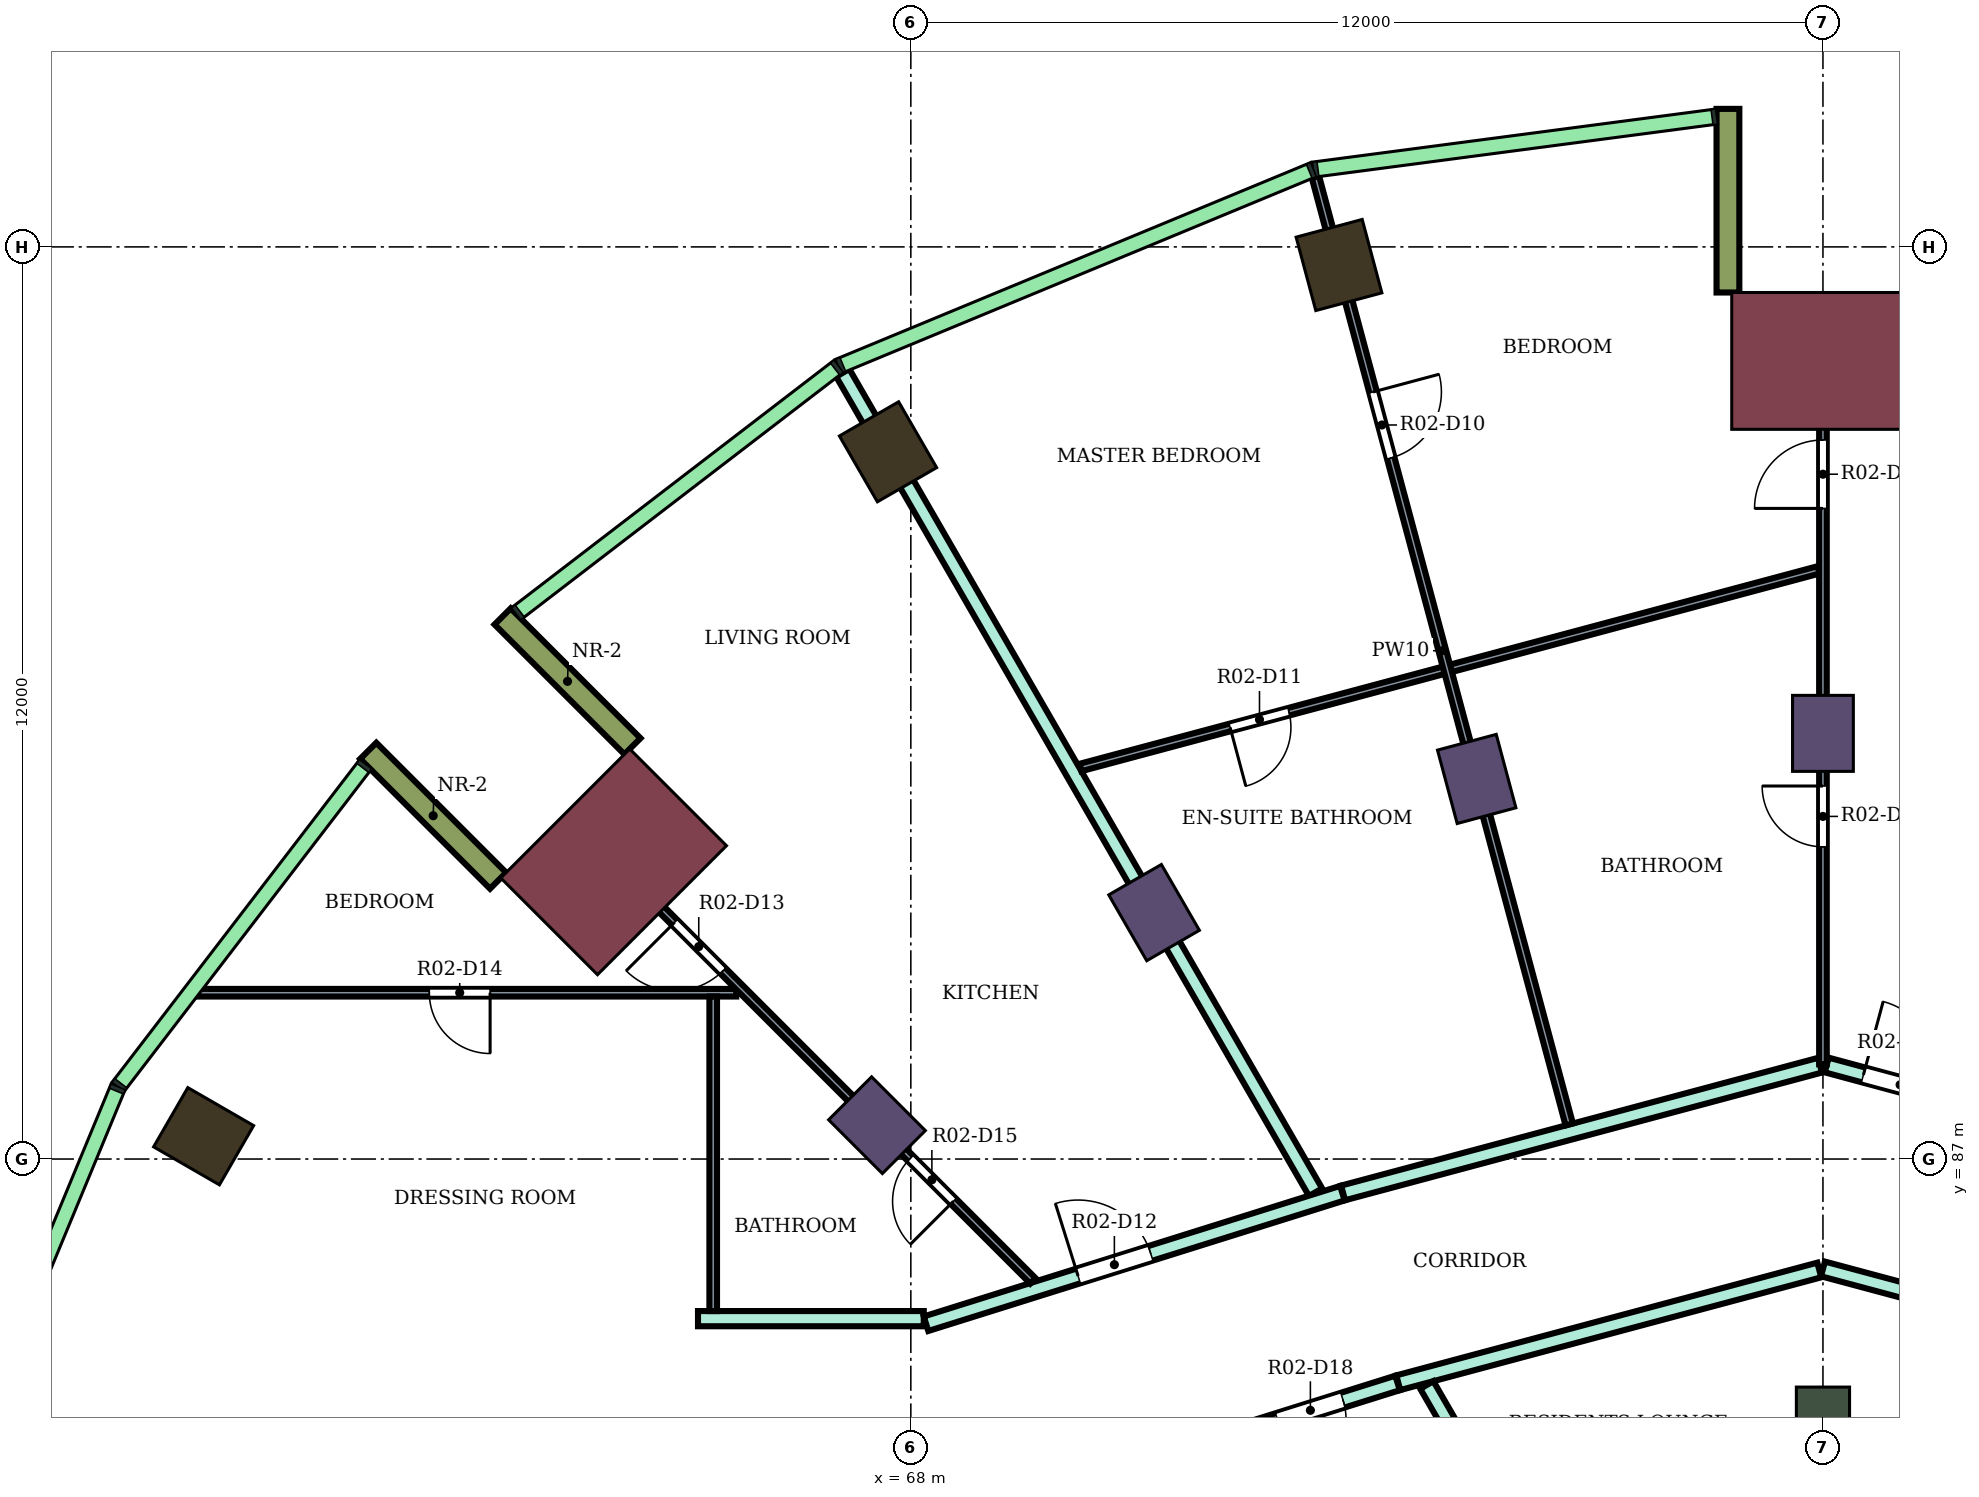
"""IFC4 building model, lengths in metres.
Left out: names, types, materials, properties, quantities, classifications, styles, units other than length and angle.
Written with IfcOpenShell. Run it as: python <this file> out.ifc"""

import sys

from ifc_helpers import new_model, si_unit, direction, frame, frame_2d, origin, origin_2d, place, context, subcontext, project, spatial, rectangle, extrude, element, fill, save


model = new_model("IFC4")
c1 = context("Model", 3, precision=1e-05, world=origin(), true_north=direction((0.0, 1.0)))
c2 = subcontext(c1, "Body", "Model", "MODEL_VIEW")
j1 = project(units=[si_unit("LENGTHUNIT", "METRE"), si_unit("PLANEANGLEUNIT", "RADIAN")], contexts=[c1])
p1 = place(None, origin())
s1 = spatial("IfcSite", under=j1, at=p1, CompositionType="ELEMENT")
p2 = place(p1, origin())
s2 = spatial("IfcBuilding", under=s1, at=p2, CompositionType="ELEMENT")
p3 = place(p2, frame((0.0, 0.0, 170.0)))
s3 = spatial("IfcBuildingStorey", under=s2, at=p3, CompositionType="ELEMENT", Elevation=170.0)
for number, where, z_axis, x_axis in (
    (1, (73.633, 98.762, 0.0), (0.0, 0.0, 1.0), (-0.259, 0.966, 0.0)),
    (2, (67.7, 96.304, 0.0), (0.0, 0.0, 1.0), (-0.5, 0.866, 0.0)),
    (3, (58.696, 87.3, 0.0), (0.0, 0.0, 1.0), (-0.866, 0.5, 0.0)),
):
    element("IfcColumn", number, at=place(p3, frame(where, z_axis=z_axis, x_axis=x_axis)), inside=s3, PredefinedType="COLUMN", context=c2, shape_type="SweptSolid", body=[
        extrude(rectangle(XDim=1.0, YDim=0.9, at=origin_2d()), origin(), (0.0, 0.0, 1.0), 4.1),
    ])
for number, where, z_axis, x_axis in (
    (4, (80.0, 92.6, 0.0), (0.0, 0.0, 1.0), (0.0, 1.0, 0.0)),
    (5, (75.445, 92.0, 0.0), (0.0, 0.0, 1.0), (-0.259, 0.966, 0.0)),
    (6, (71.2, 90.242, 0.0), (0.0, 0.0, 1.0), (-0.5, 0.866, 0.0)),
    (7, (67.555, 87.445, 0.0), (0.0, 0.0, 1.0), (-0.707, 0.707, 0.0)),
):
    element("IfcColumn", number, at=place(p3, frame(where, z_axis=z_axis, x_axis=x_axis)), inside=s3, PredefinedType="COLUMN", context=c2, shape_type="SweptSolid", body=[
        extrude(rectangle(XDim=1.0, YDim=0.8, at=origin_2d()), origin(), (0.0, 0.0, 1.0), 4.1),
    ])
p4 = place(p3, frame((80.0, 83.6, 0.0), z_axis=(0.0, 0.0, 1.0), x_axis=(0.0, 1.0, 0.0)))
e8 = element("IfcColumn", 8, at=p4, inside=s3, PredefinedType="COLUMN", context=c2, shape_type="SweptSolid", body=[
    extrude(rectangle(XDim=0.8, YDim=0.7, at=origin_2d()), origin(), (0.0, 0.0, 1.0), 4.1),
])
for number, where, z_axis, x_axis in (
    (9, (80.0, 97.5, 0.0), (0.0, 0.0, 1.0), (0.0, 1.0, 0.0)),
    (10, (64.09, 90.91, 0.0), (0.0, 0.0, 1.0), (-0.707, 0.707, 0.0)),
):
    element("IfcColumn", number, at=place(p3, frame(where, z_axis=z_axis, x_axis=x_axis)), inside=s3, PredefinedType="COLUMN", context=c2, shape_type="SweptSolid", body=[
        extrude(rectangle(XDim=1.8, YDim=2.4, at=origin_2d()), origin(), (0.0, 0.0, 1.0), 4.1),
    ])
for number, where, z_axis, x_axis in (
    (11, (78.75, 98.4, 0.0), (0.0, 0.0, 1.0), (0.0, 1.0, 0.0)),
    (12, (64.338, 92.43, 0.0), (0.0, 0.0, 1.0), (-0.707, 0.707, 0.0)),
    (13, (62.57, 90.662, 0.0), (0.0, 0.0, 1.0), (-0.707, 0.707, 0.0)),
):
    element("IfcWall", number, at=place(p3, frame(where, z_axis=z_axis, x_axis=x_axis)), inside=s3, PredefinedType="NOTDEFINED", context=c2, shape_type="SweptSolid", body=[
        extrude(rectangle(XDim=2.416, YDim=0.3, at=frame_2d((1.208, 0.0))), origin(), (0.0, 0.0, 1.0), 4.1),
    ])
p5 = place(p3, frame((65.2, 84.9, 0.0), z_axis=(0.0, 0.0, 1.0), x_axis=(1.0, 0.0, 0.0)))
e14 = element("IfcWall", 14, at=p5, inside=s3, PredefinedType="PARTITIONING", context=c2, shape_type="SweptSolid", body=[
    extrude(rectangle(XDim=2.97, YDim=0.2, at=frame_2d((1.485, 0.0))), origin(), (0.0, 0.0, 1.0), 3.65),
])
p6 = place(p3, frame((67.104, 97.343, 0.0), z_axis=(0.0, 0.0, 1.0), x_axis=(0.499841888023, -0.866116670534, 0.0)))
e15 = element("IfcWall", 15, at=p6, inside=s3, PredefinedType="PARTITIONING", context=c2, shape_type="SweptSolid", body=[
    extrude(rectangle(XDim=12.446, YDim=0.2, at=frame_2d((6.223, 0.0))), origin(), (0.0, 0.0, 1.0), 3.65),
])
p7 = place(p3, frame((68.2, 84.833, 0.0), z_axis=(0.0, 0.0, 1.0), x_axis=(0.954191968402, 0.299195065863, 0.0)))
e16 = element("IfcWall", 16, at=p7, inside=s3, PredefinedType="PARTITIONING", context=c2, shape_type="SweptSolid", body=[
    extrude(rectangle(XDim=5.74, YDim=0.2, at=frame_2d((2.87, 0.0))), origin(), (0.0, 0.0, 1.0), 3.65),
])
p8 = place(p7, frame((2.097, 0.0, 0.0)))
e17 = element("IfcOpeningElement", 17, at=p8, cuts=e16, PredefinedType="OPENING", context=c2, shape_type="SweptSolid", body=[
    extrude(rectangle(XDim=1.0, YDim=2.1, at=frame_2d((0.5, 1.05))), frame((0.0, 0.11, 0.0), z_axis=(0.0, -1.0, 0.0), x_axis=(1.0, 0.0, 0.0)), (0.0, 0.0, 1.0), 0.22),
])
p9 = place(p3, frame((72.1, 83.332, 0.0), z_axis=(0.0, 0.0, 1.0), x_axis=(0.954233106619, 0.299063836383, 0.0)))
e18 = element("IfcWall", 18, at=p9, inside=s3, PredefinedType="PARTITIONING", context=c2, shape_type="SweptSolid", body=[
    extrude(rectangle(XDim=2.414, YDim=0.2, at=frame_2d((1.207, 0.0))), origin(), (0.0, 0.0, 1.0), 3.65),
])
p10 = place(p9, frame((0.762, 0.0, 0.0)))
e19 = element("IfcOpeningElement", 19, at=p10, cuts=e18, PredefinedType="OPENING", context=c2, shape_type="SweptSolid", body=[
    extrude(rectangle(XDim=0.9, YDim=2.1, at=frame_2d((0.45, 1.05))), frame((0.0, 0.11, 0.0), z_axis=(0.0, -1.0, 0.0), x_axis=(1.0, 0.0, 0.0)), (0.0, 0.0, 1.0), 0.22),
])
p11 = place(p3, frame((73.687, 86.554, 0.0), z_axis=(0.0, 0.0, 1.0), x_axis=(0.96595928904, 0.258694128106, 0.0)))
e20 = element("IfcWall", 20, at=p11, inside=s3, PredefinedType="PARTITIONING", context=c2, shape_type="SweptSolid", body=[
    extrude(rectangle(XDim=6.496, YDim=0.2, at=frame_2d((3.248, 0.0))), origin(), (0.0, 0.0, 1.0), 3.65),
])
p12 = place(p3, frame((74.413, 84.057, 0.0), z_axis=(0.0, 0.0, 1.0), x_axis=(0.965970849692, 0.258650956976, 0.0)))
e21 = element("IfcWall", 21, at=p12, inside=s3, PredefinedType="PARTITIONING", context=c2, shape_type="SweptSolid", body=[
    extrude(rectangle(XDim=5.734, YDim=0.2, at=frame_2d((2.867, 0.0))), origin(), (0.0, 0.0, 1.0), 3.65),
])
p13 = place(p3, frame((74.788, 84.028, 0.0), z_axis=(0.0, 0.0, 1.0), x_axis=(0.499859501914, -0.866106505198, 0.0)))
e22 = element("IfcWall", 22, at=p13, inside=s3, PredefinedType="PARTITIONING", context=c2, shape_type="SweptSolid", body=[
    extrude(rectangle(XDim=2.724, YDim=0.2, at=frame_2d((1.362, 0.0))), origin(), (0.0, 0.0, 1.0), 3.65),
])
p14 = place(p3, frame((80.0, 85.554, 0.0), z_axis=(0.0, 0.0, 1.0), x_axis=(0.965894438951, -0.258936155845, 0.0)))
e23 = element("IfcWall", 23, at=p14, inside=s3, PredefinedType="PARTITIONING", context=c2, shape_type="SweptSolid", body=[
    extrude(rectangle(XDim=5.774, YDim=0.2, at=frame_2d((2.887, 0.0))), origin(), (0.0, 0.0, 1.0), 3.65),
])
p15 = place(p14, frame((1.841, 0.0, 0.0)))
e24 = element("IfcOpeningElement", 24, at=p15, cuts=e23, PredefinedType="OPENING", context=c2, shape_type="SweptSolid", body=[
    extrude(rectangle(XDim=1.8, YDim=2.1, at=frame_2d((0.9, 1.05))), frame((0.0, 0.11, 0.0), z_axis=(0.0, -1.0, 0.0), x_axis=(1.0, 0.0, 0.0)), (0.0, 0.0, 1.0), 0.22),
])
p16 = place(p3, frame((80.049, 88.237, 0.0), z_axis=(0.0, 0.0, 1.0), x_axis=(0.965582990495, -0.260095152718, 0.0)))
e25 = element("IfcWall", 25, at=p16, inside=s3, PredefinedType="PARTITIONING", context=c2, shape_type="SweptSolid", body=[
    extrude(rectangle(XDim=6.476, YDim=0.2, at=frame_2d((3.238, 0.0))), origin(), (0.0, 0.0, 1.0), 3.65),
])
p17 = place(p16, frame((0.5, 0.0, 0.0)))
e26 = element("IfcOpeningElement", 26, at=p17, cuts=e25, PredefinedType="OPENING", context=c2, shape_type="SweptSolid", body=[
    extrude(rectangle(XDim=1.0, YDim=2.1, at=frame_2d((0.5, 1.05))), frame((0.0, 0.11, 0.0), z_axis=(0.0, -1.0, 0.0), x_axis=(1.0, 0.0, 0.0)), (0.0, 0.0, 1.0), 0.22),
])
p18 = place(p3, frame((58.6, 89.188, 0.0), z_axis=(0.0, 0.0, 1.0), x_axis=(1.0, 0.0, 0.0)))
e27 = element("IfcWall", 27, at=p18, inside=s3, PredefinedType="PARTITIONING", context=c2, shape_type="SweptSolid", body=[
    extrude(rectangle(XDim=7.103, YDim=0.1, at=frame_2d((3.551, 0.0))), origin(), (0.0, 0.0, 1.0), 3.65),
])
p19 = place(p18, frame((3.065, 0.0, 0.0)))
e28 = element("IfcOpeningElement", 28, at=p19, cuts=e27, PredefinedType="OPENING", context=c2, shape_type="SweptSolid", body=[
    extrude(rectangle(XDim=0.8, YDim=2.1, at=frame_2d((0.4, 1.05))), frame((0.0, 0.06, 0.0), z_axis=(0.0, -1.0, 0.0), x_axis=(1.0, 0.0, 0.0)), (0.0, 0.0, 1.0), 0.12),
])
p20 = place(p3, frame((63.598, 91.407, 0.0), z_axis=(0.0, 0.0, 1.0), x_axis=(0.70700623685, -0.707207311228, 0.0)))
e29 = element("IfcWall", 29, at=p20, inside=s3, PredefinedType="PARTITIONING", context=c2, shape_type="SweptSolid", body=[
    extrude(rectangle(XDim=8.499, YDim=0.1, at=frame_2d((4.25, 0.0))), origin(), (0.0, 0.0, 1.0), 3.65),
])
p21 = place(p20, frame((1.83, 0.0, 0.0)))
e30 = element("IfcOpeningElement", 30, at=p21, cuts=e29, PredefinedType="OPENING", context=c2, shape_type="SweptSolid", body=[
    extrude(rectangle(XDim=0.9, YDim=2.1, at=frame_2d((0.45, 1.05))), frame((0.0, 0.06, 0.0), z_axis=(0.0, -1.0, 0.0), x_axis=(1.0, 0.0, 0.0)), (0.0, 0.0, 1.0), 0.12),
])
p22 = place(p20, frame((6.219, 0.0, 0.0)))
e31 = element("IfcOpeningElement", 31, at=p22, cuts=e29, PredefinedType="OPENING", context=c2, shape_type="SweptSolid", body=[
    extrude(rectangle(XDim=0.8, YDim=2.1, at=frame_2d((0.4, 1.05))), frame((0.0, 0.06, 0.0), z_axis=(0.0, -1.0, 0.0), x_axis=(1.0, 0.0, 0.0)), (0.0, 0.0, 1.0), 0.12),
])
p23 = place(p3, frame((65.4, 85.0, 0.0), z_axis=(0.0, 0.0, 1.0), x_axis=(0.0, 1.0, 0.0)))
e32 = element("IfcWall", 32, at=p23, inside=s3, PredefinedType="PARTITIONING", context=c2, shape_type="SweptSolid", body=[
    extrude(rectangle(XDim=4.138, YDim=0.1, at=frame_2d((2.069, 0.0))), origin(), (0.0, 0.0, 1.0), 3.65),
])
p24 = place(p3, frame((70.232, 92.151, 0.0), z_axis=(0.0, 0.0, 1.0), x_axis=(0.965980126086, 0.258616310405, 0.0)))
e33 = element("IfcWall", 33, at=p24, inside=s3, PredefinedType="PARTITIONING", context=c2, shape_type="SweptSolid", body=[
    extrude(rectangle(XDim=10.053, YDim=0.1, at=frame_2d((5.026, 0.0))), origin(), (0.0, 0.0, 1.0), 3.65),
])
p25 = place(p24, frame((2.038, 0.0, 0.0)))
e34 = element("IfcOpeningElement", 34, at=p25, cuts=e33, PredefinedType="OPENING", context=c2, shape_type="SweptSolid", body=[
    extrude(rectangle(XDim=0.8, YDim=2.1, at=frame_2d((0.4, 1.05))), frame((0.0, 0.06, 0.0), z_axis=(0.0, -1.0, 0.0), x_axis=(1.0, 0.0, 0.0)), (0.0, 0.0, 1.0), 0.12),
])
p26 = place(p3, frame((73.323, 99.919, 0.0), z_axis=(0.0, 0.0, 1.0), x_axis=(0.258768239436, -0.965939438194, 0.0)))
e35 = element("IfcWall", 35, at=p26, inside=s3, PredefinedType="PARTITIONING", context=c2, shape_type="SweptSolid", body=[
    extrude(rectangle(XDim=12.904, YDim=0.1, at=frame_2d((6.452, 0.0))), origin(), (0.0, 0.0, 1.0), 3.65),
])
p27 = place(p26, frame((2.927, 0.0, 0.0)))
e36 = element("IfcOpeningElement", 36, at=p27, cuts=e35, PredefinedType="OPENING", context=c2, shape_type="SweptSolid", body=[
    extrude(rectangle(XDim=0.9, YDim=2.1, at=frame_2d((0.45, 1.05))), frame((0.0, 0.06, 0.0), z_axis=(0.0, -1.0, 0.0), x_axis=(1.0, 0.0, 0.0)), (0.0, 0.0, 1.0), 0.12),
])
p28 = place(p3, frame((80.0, 88.246, 0.0), z_axis=(0.0, 0.0, 1.0), x_axis=(0.0, 1.0, 0.0)))
e37 = element("IfcWall", 37, at=p28, inside=s3, PredefinedType="PARTITIONING", context=c2, shape_type="SweptSolid", body=[
    extrude(rectangle(XDim=9.954, YDim=0.1, at=frame_2d((4.977, 0.0))), origin(), (0.0, 0.0, 1.0), 3.65),
])
p29 = place(p28, frame((7.313, 0.0, 0.0)))
e38 = element("IfcOpeningElement", 38, at=p29, cuts=e37, PredefinedType="OPENING", context=c2, shape_type="SweptSolid", body=[
    extrude(rectangle(XDim=0.9, YDim=2.1, at=frame_2d((0.45, 1.05))), frame((0.0, 0.06, 0.0), z_axis=(0.0, -1.0, 0.0), x_axis=(1.0, 0.0, 0.0)), (0.0, 0.0, 1.0), 0.12),
])
p30 = place(p28, frame((2.862, 0.0, 0.0)))
e39 = element("IfcOpeningElement", 39, at=p30, cuts=e37, PredefinedType="OPENING", context=c2, shape_type="SweptSolid", body=[
    extrude(rectangle(XDim=0.8, YDim=2.1, at=frame_2d((0.4, 1.05))), frame((0.0, 0.06, 0.0), z_axis=(0.0, -1.0, 0.0), x_axis=(1.0, 0.0, 0.0)), (0.0, 0.0, 1.0), 0.12),
])
p31 = place(p17, origin())
e40 = element("IfcDoor", 40, at=p31, inside=s3, OperationType="SINGLE_SWING_LEFT", PredefinedType="DOOR", context=c2, shape_type="SweptSolid", body=[
    extrude(rectangle(XDim=1.0, YDim=2.1, at=frame_2d((0.5, 1.05))), frame((0.0, 0.025, 0.0), z_axis=(0.0, -1.0, 0.0), x_axis=(1.0, 0.0, 0.0)), (0.0, 0.0, 1.0), 0.05),
])
fill(e26, e40)
p32 = place(p29, origin())
e41 = element("IfcDoor", 41, at=p32, inside=s3, OperationType="SINGLE_SWING_LEFT", PredefinedType="DOOR", context=c2, shape_type="SweptSolid", body=[
    extrude(rectangle(XDim=0.9, YDim=2.1, at=frame_2d((0.45, 1.05))), frame((0.0, 0.025, 0.0), z_axis=(0.0, -1.0, 0.0), x_axis=(1.0, 0.0, 0.0)), (0.0, 0.0, 1.0), 0.05),
])
fill(e38, e41)
p33 = place(p30, origin())
e42 = element("IfcDoor", 42, at=p33, inside=s3, OperationType="SINGLE_SWING_RIGHT", PredefinedType="DOOR", context=c2, shape_type="SweptSolid", body=[
    extrude(rectangle(XDim=0.8, YDim=2.1, at=frame_2d((0.4, 1.05))), frame((0.0, 0.025, 0.0), z_axis=(0.0, -1.0, 0.0), x_axis=(1.0, 0.0, 0.0)), (0.0, 0.0, 1.0), 0.05),
])
fill(e39, e42)
p34 = place(p27, origin())
e43 = element("IfcDoor", 43, at=p34, inside=s3, OperationType="SINGLE_SWING_LEFT", PredefinedType="DOOR", context=c2, shape_type="SweptSolid", body=[
    extrude(rectangle(XDim=0.9, YDim=2.1, at=frame_2d((0.45, 1.05))), frame((0.0, 0.025, 0.0), z_axis=(0.0, -1.0, 0.0), x_axis=(1.0, 0.0, 0.0)), (0.0, 0.0, 1.0), 0.05),
])
fill(e36, e43)
p35 = place(p25, frame((0.8, 0.0, 0.0), z_axis=(0.0, 0.0, 1.0), x_axis=(-1.0, 0.0, 0.0)))
e44 = element("IfcDoor", 44, at=p35, inside=s3, OperationType="SINGLE_SWING_RIGHT", PredefinedType="DOOR", context=c2, shape_type="SweptSolid", body=[
    extrude(rectangle(XDim=0.8, YDim=2.1, at=frame_2d((0.4, 1.05))), frame((0.0, 0.025, 0.0), z_axis=(0.0, -1.0, 0.0), x_axis=(1.0, 0.0, 0.0)), (0.0, 0.0, 1.0), 0.05),
])
fill(e34, e44)
p36 = place(p8, origin())
e45 = element("IfcDoor", 45, at=p36, inside=s3, OperationType="SINGLE_SWING_LEFT", PredefinedType="DOOR", context=c2, shape_type="SweptSolid", body=[
    extrude(rectangle(XDim=1.0, YDim=2.1, at=frame_2d((0.5, 1.05))), frame((0.0, 0.025, 0.0), z_axis=(0.0, -1.0, 0.0), x_axis=(1.0, 0.0, 0.0)), (0.0, 0.0, 1.0), 0.05),
])
fill(e17, e45)
p37 = place(p21, frame((0.9, 0.0, 0.0), z_axis=(0.0, 0.0, 1.0), x_axis=(-1.0, 0.0, 0.0)))
e46 = element("IfcDoor", 46, at=p37, inside=s3, OperationType="SINGLE_SWING_RIGHT", PredefinedType="DOOR", context=c2, shape_type="SweptSolid", body=[
    extrude(rectangle(XDim=0.9, YDim=2.1, at=frame_2d((0.45, 1.05))), frame((0.0, 0.025, 0.0), z_axis=(0.0, -1.0, 0.0), x_axis=(1.0, 0.0, 0.0)), (0.0, 0.0, 1.0), 0.05),
])
fill(e30, e46)
p38 = place(p19, frame((0.8, 0.0, 0.0), z_axis=(0.0, 0.0, 1.0), x_axis=(-1.0, 0.0, 0.0)))
e47 = element("IfcDoor", 47, at=p38, inside=s3, OperationType="SINGLE_SWING_LEFT", PredefinedType="DOOR", context=c2, shape_type="SweptSolid", body=[
    extrude(rectangle(XDim=0.8, YDim=2.1, at=frame_2d((0.4, 1.05))), frame((0.0, 0.025, 0.0), z_axis=(0.0, -1.0, 0.0), x_axis=(1.0, 0.0, 0.0)), (0.0, 0.0, 1.0), 0.05),
])
fill(e28, e47)
p39 = place(p22, frame((0.8, 0.0, 0.0), z_axis=(0.0, 0.0, 1.0), x_axis=(-1.0, 0.0, 0.0)))
e48 = element("IfcDoor", 48, at=p39, inside=s3, OperationType="SINGLE_SWING_LEFT", PredefinedType="DOOR", context=c2, shape_type="SweptSolid", body=[
    extrude(rectangle(XDim=0.8, YDim=2.1, at=frame_2d((0.4, 1.05))), frame((0.0, 0.025, 0.0), z_axis=(0.0, -1.0, 0.0), x_axis=(1.0, 0.0, 0.0)), (0.0, 0.0, 1.0), 0.05),
])
fill(e31, e48)
p40 = place(p10, frame((0.9, 0.0, 0.0), z_axis=(0.0, 0.0, 1.0), x_axis=(-1.0, 0.0, 0.0)))
e49 = element("IfcDoor", 49, at=p40, inside=s3, OperationType="SINGLE_SWING_RIGHT", PredefinedType="DOOR", context=c2, shape_type="SweptSolid", body=[
    extrude(rectangle(XDim=0.9, YDim=2.1, at=frame_2d((0.45, 1.05))), frame((0.0, 0.025, 0.0), z_axis=(0.0, -1.0, 0.0), x_axis=(1.0, 0.0, 0.0)), (0.0, 0.0, 1.0), 0.05),
])
fill(e19, e49)
save(model, sys.argv[1])
